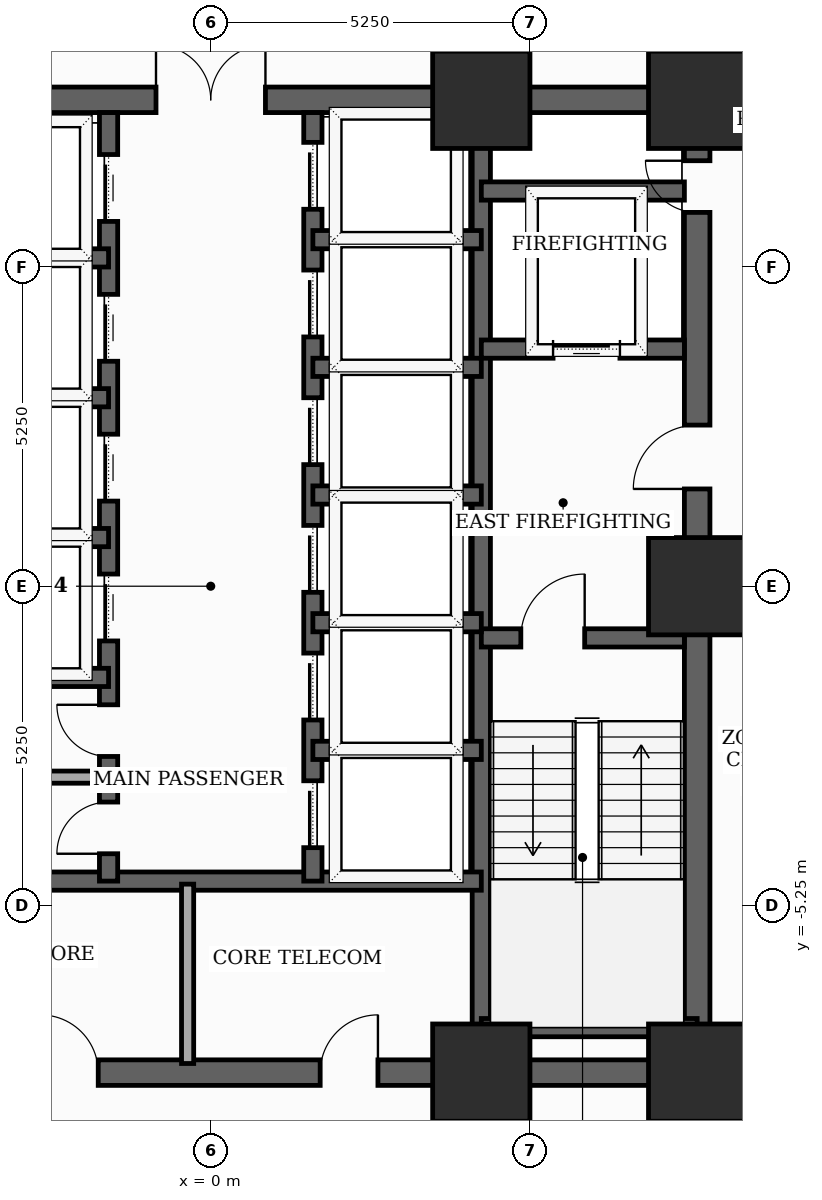
"""IFC4 building model, lengths in metres.
Left out: names, types, materials, properties, quantities, classifications, styles, units other than length and angle.
Written with IfcOpenShell. Run it as: python <this file> out.ifc"""

import sys

from ifc_helpers import new_model, si_unit, direction, frame, frame_2d, origin, origin_2d, place, context, subcontext, project, spatial, rectangle, extrude, element, fill, save


model = new_model("IFC4")
c1 = context("Model", 3, precision=1e-05, world=origin(), true_north=direction((0.0, 1.0)))
c2 = subcontext(c1, "Body", "Model", "MODEL_VIEW")
j1 = project(units=[si_unit("LENGTHUNIT", "METRE"), si_unit("PLANEANGLEUNIT", "RADIAN")], contexts=[c1])
p1 = place(None, origin())
s1 = spatial("IfcSite", under=j1, at=p1, CompositionType="ELEMENT")
p2 = place(p1, origin())
s2 = spatial("IfcBuilding", under=s1, at=p2, CompositionType="ELEMENT")
p3 = place(p2, frame((0.0, 0.0, 66.7)))
s3 = spatial("IfcBuildingStorey", under=s2, at=p3, CompositionType="ELEMENT", Elevation=66.7)
for number, where, z_axis, x_axis in (
    (1, (4.45, -8.0, 0.0), (0.0, 0.0, 1.0), (1.0, 0.0, 0.0)),
    (2, (8.0, -8.0, 0.0), (0.0, 0.0, 1.0), (1.0, 0.0, 0.0)),
    (3, (8.0, 0.0, 0.0), (0.0, 0.0, 1.0), (1.0, 0.0, 0.0)),
    (4, (8.0, 8.0, 0.0), (0.0, 0.0, 1.0), (1.0, 0.0, 0.0)),
    (5, (4.45, 8.0, 0.0), (0.0, 0.0, 1.0), (1.0, 0.0, 0.0)),
):
    element("IfcColumn", number, at=place(p3, frame(where, z_axis=z_axis, x_axis=x_axis)), inside=s3, PredefinedType="COLUMN", context=c2, shape_type="SweptSolid", body=[
        extrude(rectangle(XDim=1.6, YDim=1.6, at=origin_2d()), origin(), (0.0, 0.0, 1.0), 3.7),
    ])
p4 = place(p3, frame((8.0, -8.0, 0.0), z_axis=(0.0, 0.0, 1.0), x_axis=(0.0, 1.0, 0.0)))
e6 = element("IfcWall", 6, at=p4, inside=s3, PredefinedType="SHEAR", context=c2, shape_type="SweptSolid", body=[
    extrude(rectangle(XDim=16.0, YDim=0.42, at=frame_2d((8.0, 0.0))), origin(), (0.0, 0.0, 1.0), 3.5),
])
p5 = place(p4, frame((9.6, 0.0, 0.0)))
e7 = element("IfcOpeningElement", 7, at=p5, cuts=e6, PredefinedType="OPENING", context=c2, shape_type="SweptSolid", body=[
    extrude(rectangle(XDim=1.05, YDim=2.15, at=frame_2d((0.525, 1.075))), frame((0.0, 0.22, 0.0), z_axis=(0.0, -1.0, 0.0), x_axis=(1.0, 0.0, 0.0)), (0.0, 0.0, 1.0), 0.44),
])
p6 = place(p4, frame((14.148, 0.0, 0.0)))
e8 = element("IfcOpeningElement", 8, at=p6, cuts=e6, PredefinedType="OPENING", context=c2, shape_type="SweptSolid", body=[
    extrude(rectangle(XDim=0.85, YDim=2.02, at=frame_2d((0.425, 1.01))), frame((0.0, 0.22, 0.0), z_axis=(0.0, -1.0, 0.0), x_axis=(1.0, 0.0, 0.0)), (0.0, 0.0, 1.0), 0.44),
])
p7 = place(p3, frame((-8.0, -8.0, 0.0), z_axis=(0.0, 0.0, 1.0), x_axis=(1.0, 0.0, 0.0)))
e9 = element("IfcWall", 9, at=p7, inside=s3, PredefinedType="SHEAR", context=c2, shape_type="SweptSolid", body=[
    extrude(rectangle(XDim=16.0, YDim=0.42, at=frame_2d((8.0, 0.0))), origin(), (0.0, 0.0, 1.0), 3.5),
])
p8 = place(p7, frame((5.2, 0.0, 0.0)))
e10 = element("IfcOpeningElement", 10, at=p8, cuts=e9, PredefinedType="OPENING", context=c2, shape_type="SweptSolid", body=[
    extrude(rectangle(XDim=0.95, YDim=2.1, at=frame_2d((0.475, 1.05))), frame((0.0, 0.22, 0.0), z_axis=(0.0, -1.0, 0.0), x_axis=(1.0, 0.0, 0.0)), (0.0, 0.0, 1.0), 0.44),
])
p9 = place(p7, frame((9.8, 0.0, 0.0)))
e11 = element("IfcOpeningElement", 11, at=p9, cuts=e9, PredefinedType="OPENING", context=c2, shape_type="SweptSolid", body=[
    extrude(rectangle(XDim=0.95, YDim=2.1, at=frame_2d((0.475, 1.05))), frame((0.0, 0.22, 0.0), z_axis=(0.0, -1.0, 0.0), x_axis=(1.0, 0.0, 0.0)), (0.0, 0.0, 1.0), 0.44),
])
p10 = place(p3, frame((-8.0, 8.0, 0.0), z_axis=(0.0, 0.0, 1.0), x_axis=(1.0, 0.0, 0.0)))
e12 = element("IfcWall", 12, at=p10, inside=s3, PredefinedType="SHEAR", context=c2, shape_type="SweptSolid", body=[
    extrude(rectangle(XDim=16.0, YDim=0.42, at=frame_2d((8.0, 0.0))), origin(), (0.0, 0.0, 1.0), 3.5),
])
p11 = place(p10, frame((7.1, 0.0, 0.0)))
e13 = element("IfcOpeningElement", 13, at=p11, cuts=e12, PredefinedType="OPENING", context=c2, shape_type="SweptSolid", body=[
    extrude(rectangle(XDim=1.8, YDim=2.15, at=frame_2d((0.9, 1.075))), frame((0.0, 0.22, 0.0), z_axis=(0.0, -1.0, 0.0), x_axis=(1.0, 0.0, 0.0)), (0.0, 0.0, 1.0), 0.44),
])
p12 = place(p3, frame((4.45, -7.79, 0.0), z_axis=(0.0, 0.0, 1.0), x_axis=(0.0, 1.0, 0.0)))
e14 = element("IfcWall", 14, at=p12, inside=s3, PredefinedType="SHEAR", context=c2, shape_type="SweptSolid", body=[
    extrude(rectangle(XDim=15.58, YDim=0.3, at=frame_2d((7.79, 0.0))), origin(), (0.0, 0.0, 1.0), 3.5),
])
p13 = place(p3, frame((4.45, -0.85, 0.0), z_axis=(0.0, 0.0, 1.0), x_axis=(1.0, 0.0, 0.0)))
e15 = element("IfcWall", 15, at=p13, inside=s3, PredefinedType="SHEAR", context=c2, shape_type="SweptSolid", body=[
    extrude(rectangle(XDim=3.34, YDim=0.3, at=frame_2d((1.67, 0.0))), origin(), (0.0, 0.0, 1.0), 3.5),
])
p14 = place(p13, frame((0.65, 0.0, 0.0)))
e16 = element("IfcOpeningElement", 16, at=p14, cuts=e15, PredefinedType="OPENING", context=c2, shape_type="SweptSolid", body=[
    extrude(rectangle(XDim=1.05, YDim=2.15, at=frame_2d((0.525, 1.075))), frame((0.0, 0.16, 0.0), z_axis=(0.0, -1.0, 0.0), x_axis=(1.0, 0.0, 0.0)), (0.0, 0.0, 1.0), 0.32),
])
p15 = place(p3, frame((4.45, -7.26, 0.0), z_axis=(0.0, 0.0, 1.0), x_axis=(1.0, 0.0, 0.0)))
e17 = element("IfcWall", 17, at=p15, inside=s3, PredefinedType="SHEAR", context=c2, shape_type="SweptSolid", body=[
    extrude(rectangle(XDim=3.55, YDim=0.3, at=frame_2d((1.775, 0.0))), origin(), (0.0, 0.0, 1.0), 3.5),
])
p16 = place(p3, frame((4.45, 3.9, 0.0), z_axis=(0.0, 0.0, 1.0), x_axis=(1.0, 0.0, 0.0)))
e18 = element("IfcWall", 18, at=p16, inside=s3, PredefinedType="SHEAR", context=c2, shape_type="SweptSolid", body=[
    extrude(rectangle(XDim=3.34, YDim=0.3, at=frame_2d((1.67, 0.0))), origin(), (0.0, 0.0, 1.0), 3.5),
])
p17 = place(p16, frame((1.18, 0.0, 0.0)))
e19 = element("IfcOpeningElement", 19, at=p17, cuts=e18, PredefinedType="OPENING", context=c2, shape_type="SweptSolid", body=[
    extrude(rectangle(XDim=1.1, YDim=2.1, at=frame_2d((0.55, 1.05))), frame((0.0, 0.16, 0.0), z_axis=(0.0, -1.0, 0.0), x_axis=(1.0, 0.0, 0.0)), (0.0, 0.0, 1.0), 0.32),
])
p18 = place(p3, frame((4.45, 6.5, 0.0), z_axis=(0.0, 0.0, 1.0), x_axis=(1.0, 0.0, 0.0)))
e20 = element("IfcWall", 20, at=p18, inside=s3, PredefinedType="SHEAR", context=c2, shape_type="SweptSolid", body=[
    extrude(rectangle(XDim=3.34, YDim=0.3, at=frame_2d((1.67, 0.0))), origin(), (0.0, 0.0, 1.0), 3.5),
])
p19 = place(p3, frame((-4.45, -4.85, 0.0), z_axis=(0.0, 0.0, 1.0), x_axis=(1.0, 0.0, 0.0)))
e21 = element("IfcWall", 21, at=p19, inside=s3, PredefinedType="SHEAR", context=c2, shape_type="SweptSolid", body=[
    extrude(rectangle(XDim=8.9, YDim=0.3, at=frame_2d((4.45, 0.0))), origin(), (0.0, 0.0, 1.0), 3.5),
])
p20 = place(p3, frame((-1.68, -4.85, 0.0), z_axis=(0.0, 0.0, 1.0), x_axis=(0.0, 1.0, 0.0)))
e22 = element("IfcWall", 22, at=p20, inside=s3, PredefinedType="SHEAR", context=c2, shape_type="SweptSolid", body=[
    extrude(rectangle(XDim=12.64, YDim=0.3, at=frame_2d((6.32, 0.0))), origin(), (0.0, 0.0, 1.0), 3.5),
])
p21 = place(p20, frame((3.95, 0.0, 0.0)))
e23 = element("IfcOpeningElement", 23, at=p21, cuts=e22, PredefinedType="OPENING", context=c2, shape_type="SweptSolid", body=[
    extrude(rectangle(XDim=1.1, YDim=2.1, at=frame_2d((0.55, 1.05))), frame((0.0, 0.16, 0.0), z_axis=(0.0, -1.0, 0.0), x_axis=(1.0, 0.0, 0.0)), (0.0, 0.0, 1.0), 0.32),
])
p22 = place(p20, frame((6.25, 0.0, 0.0)))
e24 = element("IfcOpeningElement", 24, at=p22, cuts=e22, PredefinedType="OPENING", context=c2, shape_type="SweptSolid", body=[
    extrude(rectangle(XDim=1.1, YDim=2.1, at=frame_2d((0.55, 1.05))), frame((0.0, 0.16, 0.0), z_axis=(0.0, -1.0, 0.0), x_axis=(1.0, 0.0, 0.0)), (0.0, 0.0, 1.0), 0.32),
])
p23 = place(p20, frame((8.55, 0.0, 0.0)))
e25 = element("IfcOpeningElement", 25, at=p23, cuts=e22, PredefinedType="OPENING", context=c2, shape_type="SweptSolid", body=[
    extrude(rectangle(XDim=1.1, YDim=2.1, at=frame_2d((0.55, 1.05))), frame((0.0, 0.16, 0.0), z_axis=(0.0, -1.0, 0.0), x_axis=(1.0, 0.0, 0.0)), (0.0, 0.0, 1.0), 0.32),
])
p24 = place(p20, frame((10.85, 0.0, 0.0)))
e26 = element("IfcOpeningElement", 26, at=p24, cuts=e22, PredefinedType="OPENING", context=c2, shape_type="SweptSolid", body=[
    extrude(rectangle(XDim=1.1, YDim=2.1, at=frame_2d((0.55, 1.05))), frame((0.0, 0.16, 0.0), z_axis=(0.0, -1.0, 0.0), x_axis=(1.0, 0.0, 0.0)), (0.0, 0.0, 1.0), 0.32),
])
p25 = place(p20, frame((0.45, 0.0, 0.0)))
e27 = element("IfcOpeningElement", 27, at=p25, cuts=e22, PredefinedType="OPENING", context=c2, shape_type="SweptSolid", body=[
    extrude(rectangle(XDim=0.85, YDim=2.02, at=frame_2d((0.425, 1.01))), frame((0.0, 0.16, 0.0), z_axis=(0.0, -1.0, 0.0), x_axis=(1.0, 0.0, 0.0)), (0.0, 0.0, 1.0), 0.32),
])
p26 = place(p20, frame((2.05, 0.0, 0.0)))
e28 = element("IfcOpeningElement", 28, at=p26, cuts=e22, PredefinedType="OPENING", context=c2, shape_type="SweptSolid", body=[
    extrude(rectangle(XDim=0.85, YDim=2.02, at=frame_2d((0.425, 1.01))), frame((0.0, 0.16, 0.0), z_axis=(0.0, -1.0, 0.0), x_axis=(1.0, 0.0, 0.0)), (0.0, 0.0, 1.0), 0.32),
])
p27 = place(p3, frame((1.68, -4.85, 0.0), z_axis=(0.0, 0.0, 1.0), x_axis=(0.0, 1.0, 0.0)))
e29 = element("IfcWall", 29, at=p27, inside=s3, PredefinedType="SHEAR", context=c2, shape_type="SweptSolid", body=[
    extrude(rectangle(XDim=12.64, YDim=0.3, at=frame_2d((6.32, 0.0))), origin(), (0.0, 0.0, 1.0), 3.5),
])
p28 = place(p27, frame((0.55, 0.0, 0.0)))
e30 = element("IfcOpeningElement", 30, at=p28, cuts=e29, PredefinedType="OPENING", context=c2, shape_type="SweptSolid", body=[
    extrude(rectangle(XDim=1.1, YDim=2.1, at=frame_2d((0.55, 1.05))), frame((0.0, 0.16, 0.0), z_axis=(0.0, -1.0, 0.0), x_axis=(1.0, 0.0, 0.0)), (0.0, 0.0, 1.0), 0.32),
])
p29 = place(p27, frame((2.65, 0.0, 0.0)))
e31 = element("IfcOpeningElement", 31, at=p29, cuts=e29, PredefinedType="OPENING", context=c2, shape_type="SweptSolid", body=[
    extrude(rectangle(XDim=1.1, YDim=2.1, at=frame_2d((0.55, 1.05))), frame((0.0, 0.16, 0.0), z_axis=(0.0, -1.0, 0.0), x_axis=(1.0, 0.0, 0.0)), (0.0, 0.0, 1.0), 0.32),
])
p30 = place(p27, frame((4.75, 0.0, 0.0)))
e32 = element("IfcOpeningElement", 32, at=p30, cuts=e29, PredefinedType="OPENING", context=c2, shape_type="SweptSolid", body=[
    extrude(rectangle(XDim=1.1, YDim=2.1, at=frame_2d((0.55, 1.05))), frame((0.0, 0.16, 0.0), z_axis=(0.0, -1.0, 0.0), x_axis=(1.0, 0.0, 0.0)), (0.0, 0.0, 1.0), 0.32),
])
p31 = place(p27, frame((6.85, 0.0, 0.0)))
e33 = element("IfcOpeningElement", 33, at=p31, cuts=e29, PredefinedType="OPENING", context=c2, shape_type="SweptSolid", body=[
    extrude(rectangle(XDim=1.1, YDim=2.1, at=frame_2d((0.55, 1.05))), frame((0.0, 0.16, 0.0), z_axis=(0.0, -1.0, 0.0), x_axis=(1.0, 0.0, 0.0)), (0.0, 0.0, 1.0), 0.32),
])
p32 = place(p27, frame((8.95, 0.0, 0.0)))
e34 = element("IfcOpeningElement", 34, at=p32, cuts=e29, PredefinedType="OPENING", context=c2, shape_type="SweptSolid", body=[
    extrude(rectangle(XDim=1.1, YDim=2.1, at=frame_2d((0.55, 1.05))), frame((0.0, 0.16, 0.0), z_axis=(0.0, -1.0, 0.0), x_axis=(1.0, 0.0, 0.0)), (0.0, 0.0, 1.0), 0.32),
])
p33 = place(p27, frame((11.05, 0.0, 0.0)))
e35 = element("IfcOpeningElement", 35, at=p33, cuts=e29, PredefinedType="OPENING", context=c2, shape_type="SweptSolid", body=[
    extrude(rectangle(XDim=1.1, YDim=2.1, at=frame_2d((0.55, 1.05))), frame((0.0, 0.16, 0.0), z_axis=(0.0, -1.0, 0.0), x_axis=(1.0, 0.0, 0.0)), (0.0, 0.0, 1.0), 0.32),
])
for number, where, z_axis, x_axis in (
    (36, (-4.45, -1.5, 0.0), (0.0, 0.0, 1.0), (1.0, 0.0, 0.0)),
    (37, (-4.45, 0.8, 0.0), (0.0, 0.0, 1.0), (1.0, 0.0, 0.0)),
    (38, (-4.45, 3.1, 0.0), (0.0, 0.0, 1.0), (1.0, 0.0, 0.0)),
    (39, (-4.45, 5.4, 0.0), (0.0, 0.0, 1.0), (1.0, 0.0, 0.0)),
    (40, (1.68, 1.5, 0.0), (0.0, 0.0, 1.0), (1.0, 0.0, 0.0)),
    (41, (1.68, 3.6, 0.0), (0.0, 0.0, 1.0), (1.0, 0.0, 0.0)),
    (42, (1.68, 5.7, 0.0), (0.0, 0.0, 1.0), (1.0, 0.0, 0.0)),
    (43, (1.68, -2.7, 0.0), (0.0, 0.0, 1.0), (1.0, 0.0, 0.0)),
    (44, (1.68, -0.6, 0.0), (0.0, 0.0, 1.0), (1.0, 0.0, 0.0)),
):
    element("IfcWall", number, at=place(p3, frame(where, z_axis=z_axis, x_axis=x_axis)), inside=s3, PredefinedType="SHEAR", context=c2, shape_type="SweptSolid", body=[
        extrude(rectangle(XDim=2.77, YDim=0.3, at=frame_2d((1.385, 0.0))), origin(), (0.0, 0.0, 1.0), 3.5),
    ])
p34 = place(p3, frame((-0.38, -7.85, 0.0), z_axis=(0.0, 0.0, 1.0), x_axis=(0.0, 1.0, 0.0)))
e45 = element("IfcWall", 45, at=p34, inside=s3, PredefinedType="SOLIDWALL", context=c2, shape_type="SweptSolid", body=[
    extrude(rectangle(XDim=2.95, YDim=0.2, at=frame_2d((1.475, 0.0))), origin(), (0.0, 0.0, 1.0), 2.885),
])
p35 = place(p3, frame((-4.4, -3.14, 0.0), z_axis=(0.0, 0.0, 1.0), x_axis=(1.0, 0.0, 0.0)))
e46 = element("IfcWall", 46, at=p35, inside=s3, PredefinedType="SOLIDWALL", context=c2, shape_type="SweptSolid", body=[
    extrude(rectangle(XDim=2.68, YDim=0.2, at=frame_2d((1.34, 0.0))), origin(), (0.0, 0.0, 1.0), 3.5),
])
p36 = place(p5, origin())
e47 = element("IfcDoor", 47, at=p36, inside=s3, OperationType="SINGLE_SWING_LEFT", PredefinedType="DOOR", context=c2, shape_type="SweptSolid", body=[
    extrude(rectangle(XDim=1.05, YDim=2.15, at=frame_2d((0.525, 1.075))), frame((0.0, 0.025, 0.0), z_axis=(0.0, -1.0, 0.0), x_axis=(1.0, 0.0, 0.0)), (0.0, 0.0, 1.0), 0.05),
])
fill(e7, e47)
p37 = place(p6, origin())
e48 = element("IfcDoor", 48, at=p37, inside=s3, OperationType="SINGLE_SWING_RIGHT", PredefinedType="TRAPDOOR", context=c2, shape_type="SweptSolid", body=[
    extrude(rectangle(XDim=0.85, YDim=2.02, at=frame_2d((0.425, 1.01))), frame((0.0, 0.025, 0.0), z_axis=(0.0, -1.0, 0.0), x_axis=(1.0, 0.0, 0.0)), (0.0, 0.0, 1.0), 0.05),
])
fill(e8, e48)
p38 = place(p8, origin())
e49 = element("IfcDoor", 49, at=p38, inside=s3, OperationType="SINGLE_SWING_LEFT", PredefinedType="DOOR", context=c2, shape_type="SweptSolid", body=[
    extrude(rectangle(XDim=0.95, YDim=2.1, at=frame_2d((0.475, 1.05))), frame((0.0, 0.025, 0.0), z_axis=(0.0, -1.0, 0.0), x_axis=(1.0, 0.0, 0.0)), (0.0, 0.0, 1.0), 0.05),
])
fill(e10, e49)
p39 = place(p9, origin())
e50 = element("IfcDoor", 50, at=p39, inside=s3, OperationType="SINGLE_SWING_RIGHT", PredefinedType="DOOR", context=c2, shape_type="SweptSolid", body=[
    extrude(rectangle(XDim=0.95, YDim=2.1, at=frame_2d((0.475, 1.05))), frame((0.0, 0.025, 0.0), z_axis=(0.0, -1.0, 0.0), x_axis=(1.0, 0.0, 0.0)), (0.0, 0.0, 1.0), 0.05),
])
fill(e11, e50)
p40 = place(p11, origin())
e51 = element("IfcDoor", 51, at=p40, inside=s3, OperationType="DOUBLE_DOOR_SINGLE_SWING", PredefinedType="DOOR", context=c2, shape_type="SweptSolid", body=[
    extrude(rectangle(XDim=1.8, YDim=2.15, at=frame_2d((0.9, 1.075))), frame((0.0, 0.025, 0.0), z_axis=(0.0, -1.0, 0.0), x_axis=(1.0, 0.0, 0.0)), (0.0, 0.0, 1.0), 0.05),
])
fill(e13, e51)
p41 = place(p14, origin())
e52 = element("IfcDoor", 52, at=p41, inside=s3, OperationType="SINGLE_SWING_RIGHT", PredefinedType="DOOR", context=c2, shape_type="SweptSolid", body=[
    extrude(rectangle(XDim=1.05, YDim=2.15, at=frame_2d((0.525, 1.075))), frame((0.0, 0.025, 0.0), z_axis=(0.0, -1.0, 0.0), x_axis=(1.0, 0.0, 0.0)), (0.0, 0.0, 1.0), 0.05),
])
fill(e16, e52)
p42 = place(p17, origin())
e53 = element("IfcDoor", 53, at=p42, inside=s3, OperationType="SLIDING_TO_LEFT", PredefinedType="DOOR", context=c2, shape_type="SweptSolid", body=[
    extrude(rectangle(XDim=1.1, YDim=2.1, at=frame_2d((0.55, 1.05))), frame((0.0, 0.025, 0.0), z_axis=(0.0, -1.0, 0.0), x_axis=(1.0, 0.0, 0.0)), (0.0, 0.0, 1.0), 0.05),
])
fill(e19, e53)
p43 = place(p21, origin())
e54 = element("IfcDoor", 54, at=p43, inside=s3, OperationType="SLIDING_TO_LEFT", PredefinedType="DOOR", context=c2, shape_type="SweptSolid", body=[
    extrude(rectangle(XDim=1.1, YDim=2.1, at=frame_2d((0.55, 1.05))), frame((0.0, 0.025, 0.0), z_axis=(0.0, -1.0, 0.0), x_axis=(1.0, 0.0, 0.0)), (0.0, 0.0, 1.0), 0.05),
])
fill(e23, e54)
p44 = place(p22, origin())
e55 = element("IfcDoor", 55, at=p44, inside=s3, OperationType="SLIDING_TO_LEFT", PredefinedType="DOOR", context=c2, shape_type="SweptSolid", body=[
    extrude(rectangle(XDim=1.1, YDim=2.1, at=frame_2d((0.55, 1.05))), frame((0.0, 0.025, 0.0), z_axis=(0.0, -1.0, 0.0), x_axis=(1.0, 0.0, 0.0)), (0.0, 0.0, 1.0), 0.05),
])
fill(e24, e55)
p45 = place(p23, origin())
e56 = element("IfcDoor", 56, at=p45, inside=s3, OperationType="SLIDING_TO_LEFT", PredefinedType="DOOR", context=c2, shape_type="SweptSolid", body=[
    extrude(rectangle(XDim=1.1, YDim=2.1, at=frame_2d((0.55, 1.05))), frame((0.0, 0.025, 0.0), z_axis=(0.0, -1.0, 0.0), x_axis=(1.0, 0.0, 0.0)), (0.0, 0.0, 1.0), 0.05),
])
fill(e25, e56)
p46 = place(p24, origin())
e57 = element("IfcDoor", 57, at=p46, inside=s3, OperationType="SLIDING_TO_LEFT", PredefinedType="DOOR", context=c2, shape_type="SweptSolid", body=[
    extrude(rectangle(XDim=1.1, YDim=2.1, at=frame_2d((0.55, 1.05))), frame((0.0, 0.025, 0.0), z_axis=(0.0, -1.0, 0.0), x_axis=(1.0, 0.0, 0.0)), (0.0, 0.0, 1.0), 0.05),
])
fill(e26, e57)
p47 = place(p25, origin())
e58 = element("IfcDoor", 58, at=p47, inside=s3, OperationType="SINGLE_SWING_LEFT", PredefinedType="TRAPDOOR", context=c2, shape_type="SweptSolid", body=[
    extrude(rectangle(XDim=0.85, YDim=2.02, at=frame_2d((0.425, 1.01))), frame((0.0, 0.025, 0.0), z_axis=(0.0, -1.0, 0.0), x_axis=(1.0, 0.0, 0.0)), (0.0, 0.0, 1.0), 0.05),
])
fill(e27, e58)
p48 = place(p26, origin())
e59 = element("IfcDoor", 59, at=p48, inside=s3, OperationType="SINGLE_SWING_RIGHT", PredefinedType="TRAPDOOR", context=c2, shape_type="SweptSolid", body=[
    extrude(rectangle(XDim=0.85, YDim=2.02, at=frame_2d((0.425, 1.01))), frame((0.0, 0.025, 0.0), z_axis=(0.0, -1.0, 0.0), x_axis=(1.0, 0.0, 0.0)), (0.0, 0.0, 1.0), 0.05),
])
fill(e28, e59)
p49 = place(p28, origin())
e60 = element("IfcDoor", 60, at=p49, inside=s3, OperationType="SLIDING_TO_LEFT", PredefinedType="DOOR", context=c2, shape_type="SweptSolid", body=[
    extrude(rectangle(XDim=1.1, YDim=2.1, at=frame_2d((0.55, 1.05))), frame((0.0, 0.025, 0.0), z_axis=(0.0, -1.0, 0.0), x_axis=(1.0, 0.0, 0.0)), (0.0, 0.0, 1.0), 0.05),
])
fill(e30, e60)
p50 = place(p29, origin())
e61 = element("IfcDoor", 61, at=p50, inside=s3, OperationType="SLIDING_TO_LEFT", PredefinedType="DOOR", context=c2, shape_type="SweptSolid", body=[
    extrude(rectangle(XDim=1.1, YDim=2.1, at=frame_2d((0.55, 1.05))), frame((0.0, 0.025, 0.0), z_axis=(0.0, -1.0, 0.0), x_axis=(1.0, 0.0, 0.0)), (0.0, 0.0, 1.0), 0.05),
])
fill(e31, e61)
p51 = place(p30, origin())
e62 = element("IfcDoor", 62, at=p51, inside=s3, OperationType="SLIDING_TO_LEFT", PredefinedType="DOOR", context=c2, shape_type="SweptSolid", body=[
    extrude(rectangle(XDim=1.1, YDim=2.1, at=frame_2d((0.55, 1.05))), frame((0.0, 0.025, 0.0), z_axis=(0.0, -1.0, 0.0), x_axis=(1.0, 0.0, 0.0)), (0.0, 0.0, 1.0), 0.05),
])
fill(e32, e62)
p52 = place(p31, origin())
e63 = element("IfcDoor", 63, at=p52, inside=s3, OperationType="SLIDING_TO_LEFT", PredefinedType="DOOR", context=c2, shape_type="SweptSolid", body=[
    extrude(rectangle(XDim=1.1, YDim=2.1, at=frame_2d((0.55, 1.05))), frame((0.0, 0.025, 0.0), z_axis=(0.0, -1.0, 0.0), x_axis=(1.0, 0.0, 0.0)), (0.0, 0.0, 1.0), 0.05),
])
fill(e33, e63)
p53 = place(p32, origin())
e64 = element("IfcDoor", 64, at=p53, inside=s3, OperationType="SLIDING_TO_LEFT", PredefinedType="DOOR", context=c2, shape_type="SweptSolid", body=[
    extrude(rectangle(XDim=1.1, YDim=2.1, at=frame_2d((0.55, 1.05))), frame((0.0, 0.025, 0.0), z_axis=(0.0, -1.0, 0.0), x_axis=(1.0, 0.0, 0.0)), (0.0, 0.0, 1.0), 0.05),
])
fill(e34, e64)
p54 = place(p33, origin())
e65 = element("IfcDoor", 65, at=p54, inside=s3, OperationType="SLIDING_TO_LEFT", PredefinedType="DOOR", context=c2, shape_type="SweptSolid", body=[
    extrude(rectangle(XDim=1.1, YDim=2.1, at=frame_2d((0.55, 1.05))), frame((0.0, 0.025, 0.0), z_axis=(0.0, -1.0, 0.0), x_axis=(1.0, 0.0, 0.0)), (0.0, 0.0, 1.0), 0.05),
])
fill(e35, e65)
save(model, sys.argv[1])
